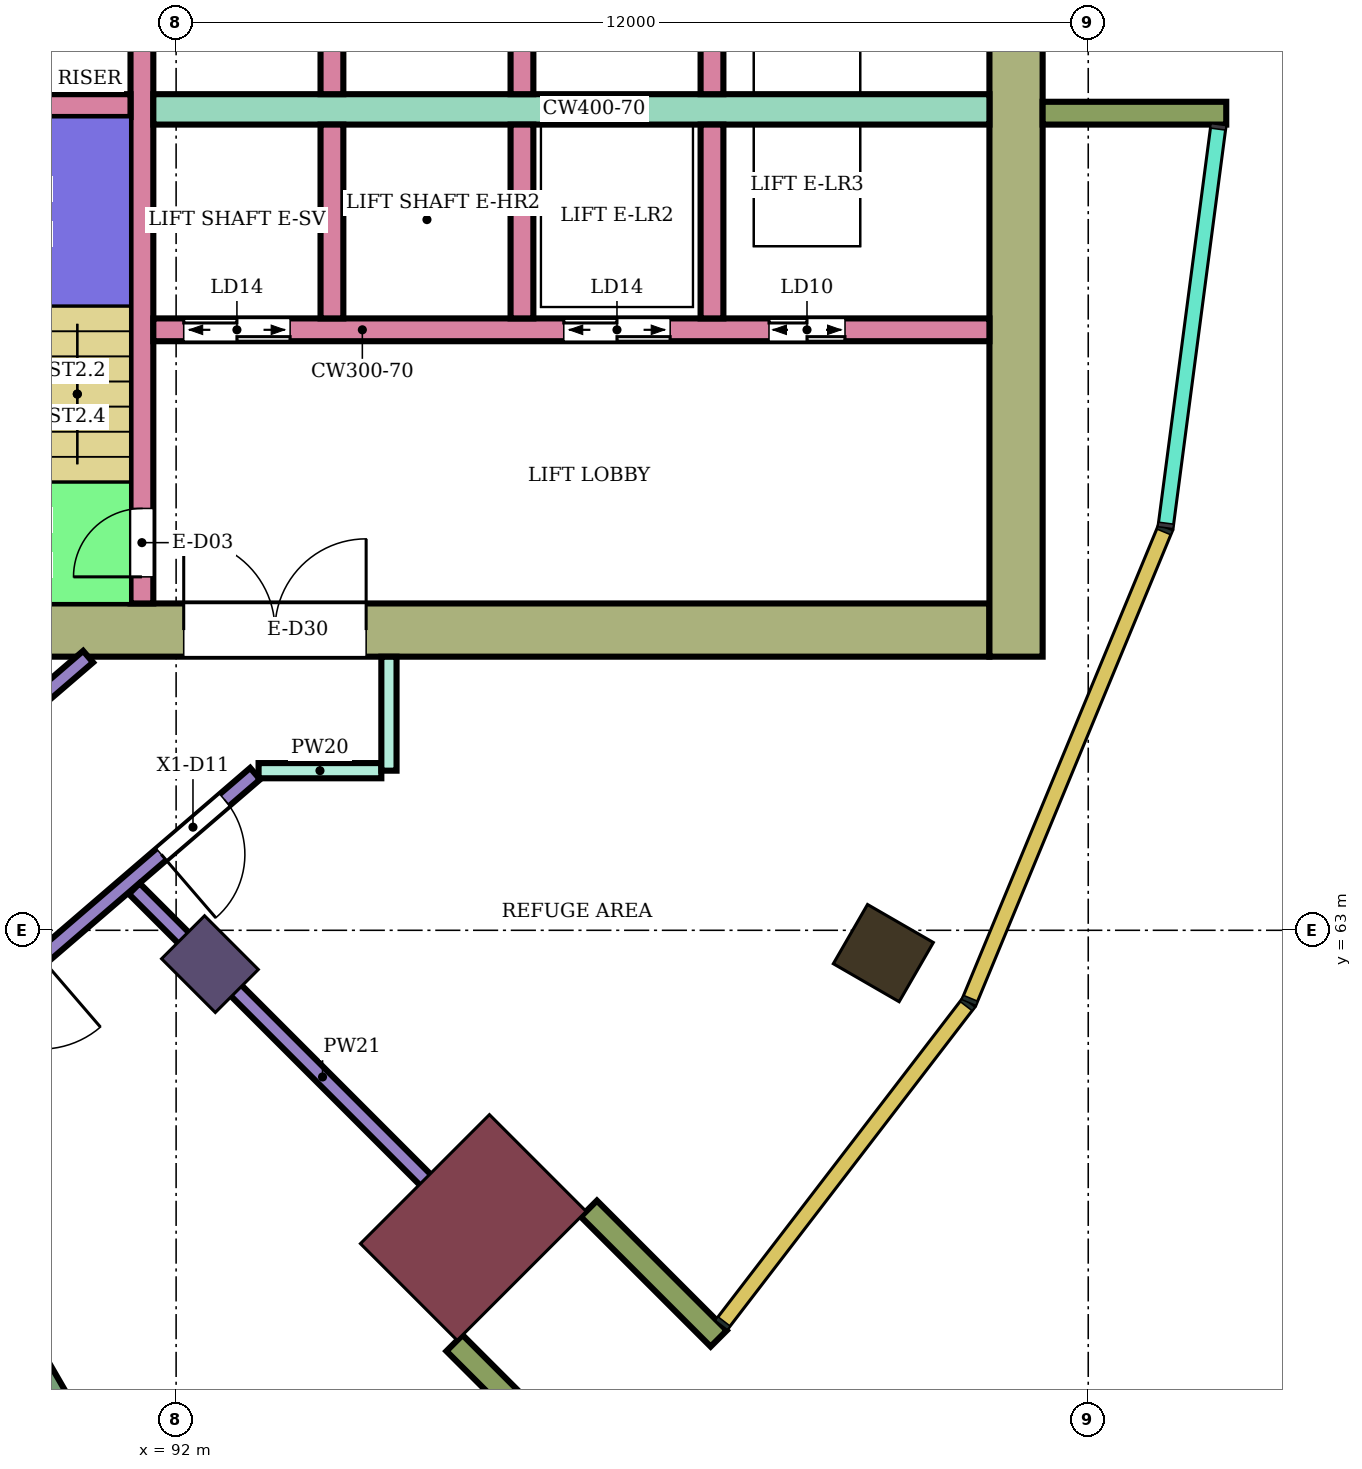
"""IFC4 building model, lengths in metres.
Left out: names, types, materials, properties, quantities, classifications, styles, units other than length and angle.
Written with IfcOpenShell. Run it as: python <this file> out.ifc"""

import sys

from ifc_helpers import new_model, si_unit, direction, frame, frame_2d, origin, origin_2d, place, context, subcontext, project, spatial, rectangle, extrude, element, fill, save


model = new_model("IFC4")
c1 = context("Model", 3, precision=1e-05, world=origin(), true_north=direction((0.0, 1.0)))
c2 = subcontext(c1, "Body", "Model", "MODEL_VIEW")
j1 = project(units=[si_unit("LENGTHUNIT", "METRE"), si_unit("PLANEANGLEUNIT", "RADIAN")], contexts=[c1])
p1 = place(None, origin())
s1 = spatial("IfcSite", under=j1, at=p1, CompositionType="ELEMENT")
p2 = place(p1, origin())
s2 = spatial("IfcBuilding", under=s1, at=p2, CompositionType="ELEMENT")
p3 = place(p2, frame((0.0, 0.0, 109.0)))
s3 = spatial("IfcBuildingStorey", under=s2, at=p3, CompositionType="ELEMENT", Elevation=109.0)
p4 = place(p3, frame((101.304, 62.7, 0.0), z_axis=(0.0, 0.0, 1.0), x_axis=(0.866025403784, -0.5, 0.0)))
e1 = element("IfcColumn", 1, at=p4, inside=s3, PredefinedType="COLUMN", context=c2, shape_type="SweptSolid", body=[
    extrude(rectangle(XDim=1.0, YDim=0.9, at=origin_2d()), origin(), (0.0, 0.0, 1.0), 5.6),
])
p5 = place(p3, frame((92.445, 62.555, 0.0), z_axis=(0.0, 0.0, 1.0), x_axis=(0.707106781187, -0.707106781187, 0.0)))
e2 = element("IfcColumn", 2, at=p5, inside=s3, PredefinedType="COLUMN", context=c2, shape_type="SweptSolid", body=[
    extrude(rectangle(XDim=1.0, YDim=0.8, at=origin_2d()), origin(), (0.0, 0.0, 1.0), 5.6),
])
p6 = place(p3, frame((95.91, 59.09, 0.0), z_axis=(0.0, 0.0, 1.0), x_axis=(0.707106781187, -0.707106781187, 0.0)))
e3 = element("IfcColumn", 3, at=p6, inside=s3, PredefinedType="COLUMN", context=c2, shape_type="SweptSolid", body=[
    extrude(rectangle(XDim=1.8, YDim=2.4, at=origin_2d()), origin(), (0.0, 0.0, 1.0), 5.6),
])
p7 = place(p3, frame((87.9, 66.95, 0.0), z_axis=(0.0, 0.0, 1.0), x_axis=(1.0, 0.0, 0.0)))
e4 = element("IfcWall", 4, at=p7, inside=s3, PredefinedType="SHEAR", context=c2, shape_type="SweptSolid", body=[
    extrude(rectangle(XDim=14.8, YDim=0.7, at=frame_2d((7.4, 0.0))), origin(), (0.0, 0.0, 1.0), 5.28),
])
p8 = place(p7, frame((4.2, 0.0, 0.0)))
e5 = element("IfcOpeningElement", 5, at=p8, cuts=e4, PredefinedType="OPENING", context=c2, shape_type="SweptSolid", body=[
    extrude(rectangle(XDim=2.4, YDim=2.4, at=frame_2d((1.2, 1.2))), frame((0.0, 0.36, 0.0), z_axis=(0.0, -1.0, 0.0), x_axis=(1.0, 0.0, 0.0)), (0.0, 0.0, 1.0), 0.72),
])
p9 = place(p3, frame((103.05, 66.6, 0.0), z_axis=(0.0, 0.0, 1.0), x_axis=(0.0, 1.0, 0.0)))
e6 = element("IfcWall", 6, at=p9, inside=s3, PredefinedType="SHEAR", context=c2, shape_type="SweptSolid", body=[
    extrude(rectangle(XDim=16.8, YDim=0.7, at=frame_2d((8.4, 0.0))), origin(), (0.0, 0.0, 1.0), 5.28),
])
p10 = place(p3, frame((91.55, 67.3, 0.0), z_axis=(0.0, 0.0, 1.0), x_axis=(0.0, 1.0, 0.0)))
e7 = element("IfcWall", 7, at=p10, inside=s3, PredefinedType="SHEAR", context=c2, shape_type="SweptSolid", body=[
    extrude(rectangle(XDim=7.7, YDim=0.3, at=frame_2d((3.85, 0.0))), origin(), (0.0, 0.0, 1.0), 5.28),
])
p11 = place(p10, frame((0.35, 0.0, 0.0)))
e8 = element("IfcOpeningElement", 8, at=p11, cuts=e7, PredefinedType="OPENING", context=c2, shape_type="SweptSolid", body=[
    extrude(rectangle(XDim=0.9, YDim=2.1, at=frame_2d((0.45, 1.05))), frame((0.0, 0.16, 0.0), z_axis=(0.0, -1.0, 0.0), x_axis=(1.0, 0.0, 0.0)), (0.0, 0.0, 1.0), 0.32),
])
p12 = place(p3, frame((88.35, 73.85, 0.0), z_axis=(0.0, 0.0, 1.0), x_axis=(1.0, 0.0, 0.0)))
e9 = element("IfcWall", 9, at=p12, inside=s3, PredefinedType="SHEAR", context=c2, shape_type="SweptSolid", body=[
    extrude(rectangle(XDim=3.05, YDim=0.3, at=frame_2d((1.525, 0.0))), origin(), (0.0, 0.0, 1.0), 5.28),
])
p13 = place(p3, frame((91.7, 73.8, 0.0), z_axis=(0.0, 0.0, 1.0), x_axis=(1.0, 0.0, 0.0)))
e10 = element("IfcWall", 10, at=p13, inside=s3, PredefinedType="SHEAR", context=c2, shape_type="SweptSolid", body=[
    extrude(rectangle(XDim=11.0, YDim=0.4, at=frame_2d((5.5, 0.0))), origin(), (0.0, 0.0, 1.0), 5.28),
])
p14 = place(p3, frame((91.7, 70.9, 0.0), z_axis=(0.0, 0.0, 1.0), x_axis=(1.0, 0.0, 0.0)))
e11 = element("IfcWall", 11, at=p14, inside=s3, PredefinedType="SHEAR", context=c2, shape_type="SweptSolid", body=[
    extrude(rectangle(XDim=11.0, YDim=0.3, at=frame_2d((5.5, 0.0))), origin(), (0.0, 0.0, 1.0), 5.28),
])
p15 = place(p14, frame((0.4, 0.0, 0.0)))
e12 = element("IfcOpeningElement", 12, at=p15, cuts=e11, PredefinedType="OPENING", context=c2, shape_type="SweptSolid", body=[
    extrude(rectangle(XDim=1.4, YDim=2.1, at=frame_2d((0.7, 1.05))), frame((0.0, 0.16, 0.0), z_axis=(0.0, -1.0, 0.0), x_axis=(1.0, 0.0, 0.0)), (0.0, 0.0, 1.0), 0.32),
])
p16 = place(p14, frame((5.4, 0.0, 0.0)))
e13 = element("IfcOpeningElement", 13, at=p16, cuts=e11, PredefinedType="OPENING", context=c2, shape_type="SweptSolid", body=[
    extrude(rectangle(XDim=1.4, YDim=2.1, at=frame_2d((0.7, 1.05))), frame((0.0, 0.16, 0.0), z_axis=(0.0, -1.0, 0.0), x_axis=(1.0, 0.0, 0.0)), (0.0, 0.0, 1.0), 0.32),
])
p17 = place(p14, frame((8.1, 0.0, 0.0)))
e14 = element("IfcOpeningElement", 14, at=p17, cuts=e11, PredefinedType="OPENING", context=c2, shape_type="SweptSolid", body=[
    extrude(rectangle(XDim=1.0, YDim=2.1, at=frame_2d((0.5, 1.05))), frame((0.0, 0.16, 0.0), z_axis=(0.0, -1.0, 0.0), x_axis=(1.0, 0.0, 0.0)), (0.0, 0.0, 1.0), 0.32),
])
for number, where, z_axis, x_axis in (
    (15, (94.05, 74.0, 0.0), (0.0, 0.0, 1.0), (0.0, 1.0, 0.0)),
    (16, (96.55, 74.0, 0.0), (0.0, 0.0, 1.0), (0.0, 1.0, 0.0)),
    (17, (99.05, 74.0, 0.0), (0.0, 0.0, 1.0), (0.0, 1.0, 0.0)),
    (18, (94.05, 71.05, 0.0), (0.0, 0.0, 1.0), (0.0, 1.0, 0.0)),
    (19, (96.55, 71.05, 0.0), (0.0, 0.0, 1.0), (0.0, 1.0, 0.0)),
    (20, (99.05, 71.05, 0.0), (0.0, 0.0, 1.0), (0.0, 1.0, 0.0)),
):
    element("IfcWall", number, at=place(p3, frame(where, z_axis=z_axis, x_axis=x_axis)), inside=s3, PredefinedType="SHEAR", context=c2, shape_type="SweptSolid", body=[
        extrude(rectangle(XDim=2.55, YDim=0.3, at=frame_2d((1.275, 0.0))), origin(), (0.0, 0.0, 1.0), 5.28),
    ])
for number, where, z_axis, x_axis in (
    (21, (103.4, 73.75, 0.0), (0.0, 0.0, 1.0), (1.0, 0.0, 0.0)),
    (22, (95.662, 57.57, 0.0), (0.0, 0.0, 1.0), (0.707, -0.707, 0.0)),
    (23, (97.43, 59.338, 0.0), (0.0, 0.0, 1.0), (0.707, -0.707, 0.0)),
):
    element("IfcWall", number, at=place(p3, frame(where, z_axis=z_axis, x_axis=x_axis)), inside=s3, PredefinedType="NOTDEFINED", context=c2, shape_type="SweptSolid", body=[
        extrude(rectangle(XDim=2.416, YDim=0.3, at=frame_2d((1.208, 0.0))), origin(), (0.0, 0.0, 1.0), 5.6),
    ])
p18 = place(p3, frame((86.877, 63.189, 0.0), z_axis=(0.0, 0.0, 1.0), x_axis=(0.758075808328, 0.652166442581, 0.0)))
e24 = element("IfcWall", 24, at=p18, inside=s3, PredefinedType="PARTITIONING", context=c2, shape_type="SweptSolid", body=[
    extrude(rectangle(XDim=5.23, YDim=0.2, at=frame_2d((2.615, 0.0))), origin(), (0.0, 0.0, 1.0), 5.15),
])
p19 = place(p18, frame((2.015, 0.0, 0.0)))
e25 = element("IfcOpeningElement", 25, at=p19, cuts=e24, PredefinedType="OPENING", context=c2, shape_type="SweptSolid", body=[
    extrude(rectangle(XDim=1.2, YDim=2.4, at=frame_2d((0.6, 1.2))), frame((0.0, 0.11, 0.0), z_axis=(0.0, -1.0, 0.0), x_axis=(1.0, 0.0, 0.0)), (0.0, 0.0, 1.0), 0.22),
])
p20 = place(p3, frame((88.237, 60.929, 0.0), z_axis=(0.0, 0.0, 1.0), x_axis=(0.758121184653, 0.6521136936, 0.0)))
e26 = element("IfcWall", 26, at=p20, inside=s3, PredefinedType="PARTITIONING", context=c2, shape_type="SweptSolid", body=[
    extrude(rectangle(XDim=6.336, YDim=0.2, at=frame_2d((3.168, 0.0))), origin(), (0.0, 0.0, 1.0), 5.15),
])
p21 = place(p20, frame((4.707, 0.0, 0.0)))
e27 = element("IfcOpeningElement", 27, at=p21, cuts=e26, PredefinedType="OPENING", context=c2, shape_type="SweptSolid", body=[
    extrude(rectangle(XDim=1.1, YDim=2.1, at=frame_2d((0.55, 1.05))), frame((0.0, 0.11, 0.0), z_axis=(0.0, -1.0, 0.0), x_axis=(1.0, 0.0, 0.0)), (0.0, 0.0, 1.0), 0.22),
])
p22 = place(p20, frame((1.419, 0.0, 0.0)))
e28 = element("IfcOpeningElement", 28, at=p22, cuts=e26, PredefinedType="OPENING", context=c2, shape_type="SweptSolid", body=[
    extrude(rectangle(XDim=1.2, YDim=2.4, at=frame_2d((0.6, 1.2))), frame((0.0, 0.11, 0.0), z_axis=(0.0, -1.0, 0.0), x_axis=(1.0, 0.0, 0.0)), (0.0, 0.0, 1.0), 0.22),
])
p23 = place(p3, frame((88.162, 60.863, 0.0), z_axis=(0.0, 0.0, 1.0), x_axis=(0.499991628305, -0.866030237131, 0.0)))
e29 = element("IfcWall", 29, at=p23, inside=s3, PredefinedType="PARTITIONING", context=c2, shape_type="SweptSolid", body=[
    extrude(rectangle(XDim=9.474, YDim=0.2, at=frame_2d((4.737, 0.0))), origin(), (0.0, 0.0, 1.0), 4.586),
])
p24 = place(p3, frame((91.45, 63.548, 0.0), z_axis=(0.0, 0.0, 1.0), x_axis=(0.707037084594, -0.70717647091, 0.0)))
e30 = element("IfcWall", 30, at=p24, inside=s3, PredefinedType="PARTITIONING", context=c2, shape_type="SweptSolid", body=[
    extrude(rectangle(XDim=7.006, YDim=0.2, at=frame_2d((3.503, 0.0))), origin(), (0.0, 0.0, 1.0), 5.15),
])
p25 = place(p3, frame((93.085, 65.1, 0.0), z_axis=(0.0, 0.0, 1.0), x_axis=(1.0, 0.0, 0.0)))
e31 = element("IfcWall", 31, at=p25, inside=s3, PredefinedType="PARTITIONING", context=c2, shape_type="SweptSolid", body=[
    extrude(rectangle(XDim=1.615, YDim=0.2, at=frame_2d((0.808, 0.0))), origin(), (0.0, 0.0, 1.0), 5.15),
])
p26 = place(p3, frame((94.8, 65.1, 0.0), z_axis=(0.0, 0.0, 1.0), x_axis=(0.0, 1.0, 0.0)))
e32 = element("IfcWall", 32, at=p26, inside=s3, PredefinedType="PARTITIONING", context=c2, shape_type="SweptSolid", body=[
    extrude(rectangle(XDim=1.499, YDim=0.2, at=frame_2d((0.75, 0.0))), origin(), (0.0, 0.0, 1.0), 5.15),
])
p27 = place(p21, frame((1.1, 0.0, 0.0), z_axis=(0.0, 0.0, 1.0), x_axis=(-1.0, 0.0, 0.0)))
e33 = element("IfcDoor", 33, at=p27, inside=s3, OperationType="SINGLE_SWING_RIGHT", PredefinedType="DOOR", context=c2, shape_type="SweptSolid", body=[
    extrude(rectangle(XDim=1.1, YDim=2.1, at=frame_2d((0.55, 1.05))), frame((0.0, 0.025, 0.0), z_axis=(0.0, -1.0, 0.0), x_axis=(1.0, 0.0, 0.0)), (0.0, 0.0, 1.0), 0.05),
])
fill(e27, e33)
p28 = place(p11, origin())
e34 = element("IfcDoor", 34, at=p28, inside=s3, OperationType="SINGLE_SWING_LEFT", PredefinedType="DOOR", context=c2, shape_type="SweptSolid", body=[
    extrude(rectangle(XDim=0.9, YDim=2.1, at=frame_2d((0.45, 1.05))), frame((0.0, 0.025, 0.0), z_axis=(0.0, -1.0, 0.0), x_axis=(1.0, 0.0, 0.0)), (0.0, 0.0, 1.0), 0.05),
])
fill(e8, e34)
p29 = place(p15, origin())
e35 = element("IfcDoor", 35, at=p29, inside=s3, OperationType="DOUBLE_DOOR_SLIDING", PredefinedType="DOOR", context=c2, shape_type="SweptSolid", body=[
    extrude(rectangle(XDim=1.4, YDim=2.1, at=frame_2d((0.7, 1.05))), frame((0.0, 0.025, 0.0), z_axis=(0.0, -1.0, 0.0), x_axis=(1.0, 0.0, 0.0)), (0.0, 0.0, 1.0), 0.05),
])
fill(e12, e35)
p30 = place(p16, origin())
e36 = element("IfcDoor", 36, at=p30, inside=s3, OperationType="DOUBLE_DOOR_SLIDING", PredefinedType="DOOR", context=c2, shape_type="SweptSolid", body=[
    extrude(rectangle(XDim=1.4, YDim=2.1, at=frame_2d((0.7, 1.05))), frame((0.0, 0.025, 0.0), z_axis=(0.0, -1.0, 0.0), x_axis=(1.0, 0.0, 0.0)), (0.0, 0.0, 1.0), 0.05),
])
fill(e13, e36)
p31 = place(p17, origin())
e37 = element("IfcDoor", 37, at=p31, inside=s3, OperationType="DOUBLE_DOOR_SLIDING", PredefinedType="DOOR", context=c2, shape_type="SweptSolid", body=[
    extrude(rectangle(XDim=1.0, YDim=2.1, at=frame_2d((0.5, 1.05))), frame((0.0, 0.025, 0.0), z_axis=(0.0, -1.0, 0.0), x_axis=(1.0, 0.0, 0.0)), (0.0, 0.0, 1.0), 0.05),
])
fill(e14, e37)
p32 = place(p8, origin())
e38 = element("IfcDoor", 38, at=p32, inside=s3, OperationType="DOUBLE_DOOR_SINGLE_SWING", PredefinedType="DOOR", context=c2, shape_type="SweptSolid", body=[
    extrude(rectangle(XDim=2.4, YDim=2.4, at=frame_2d((1.2, 1.2))), frame((0.0, 0.025, 0.0), z_axis=(0.0, -1.0, 0.0), x_axis=(1.0, 0.0, 0.0)), (0.0, 0.0, 1.0), 0.05),
])
fill(e5, e38)
save(model, sys.argv[1])
